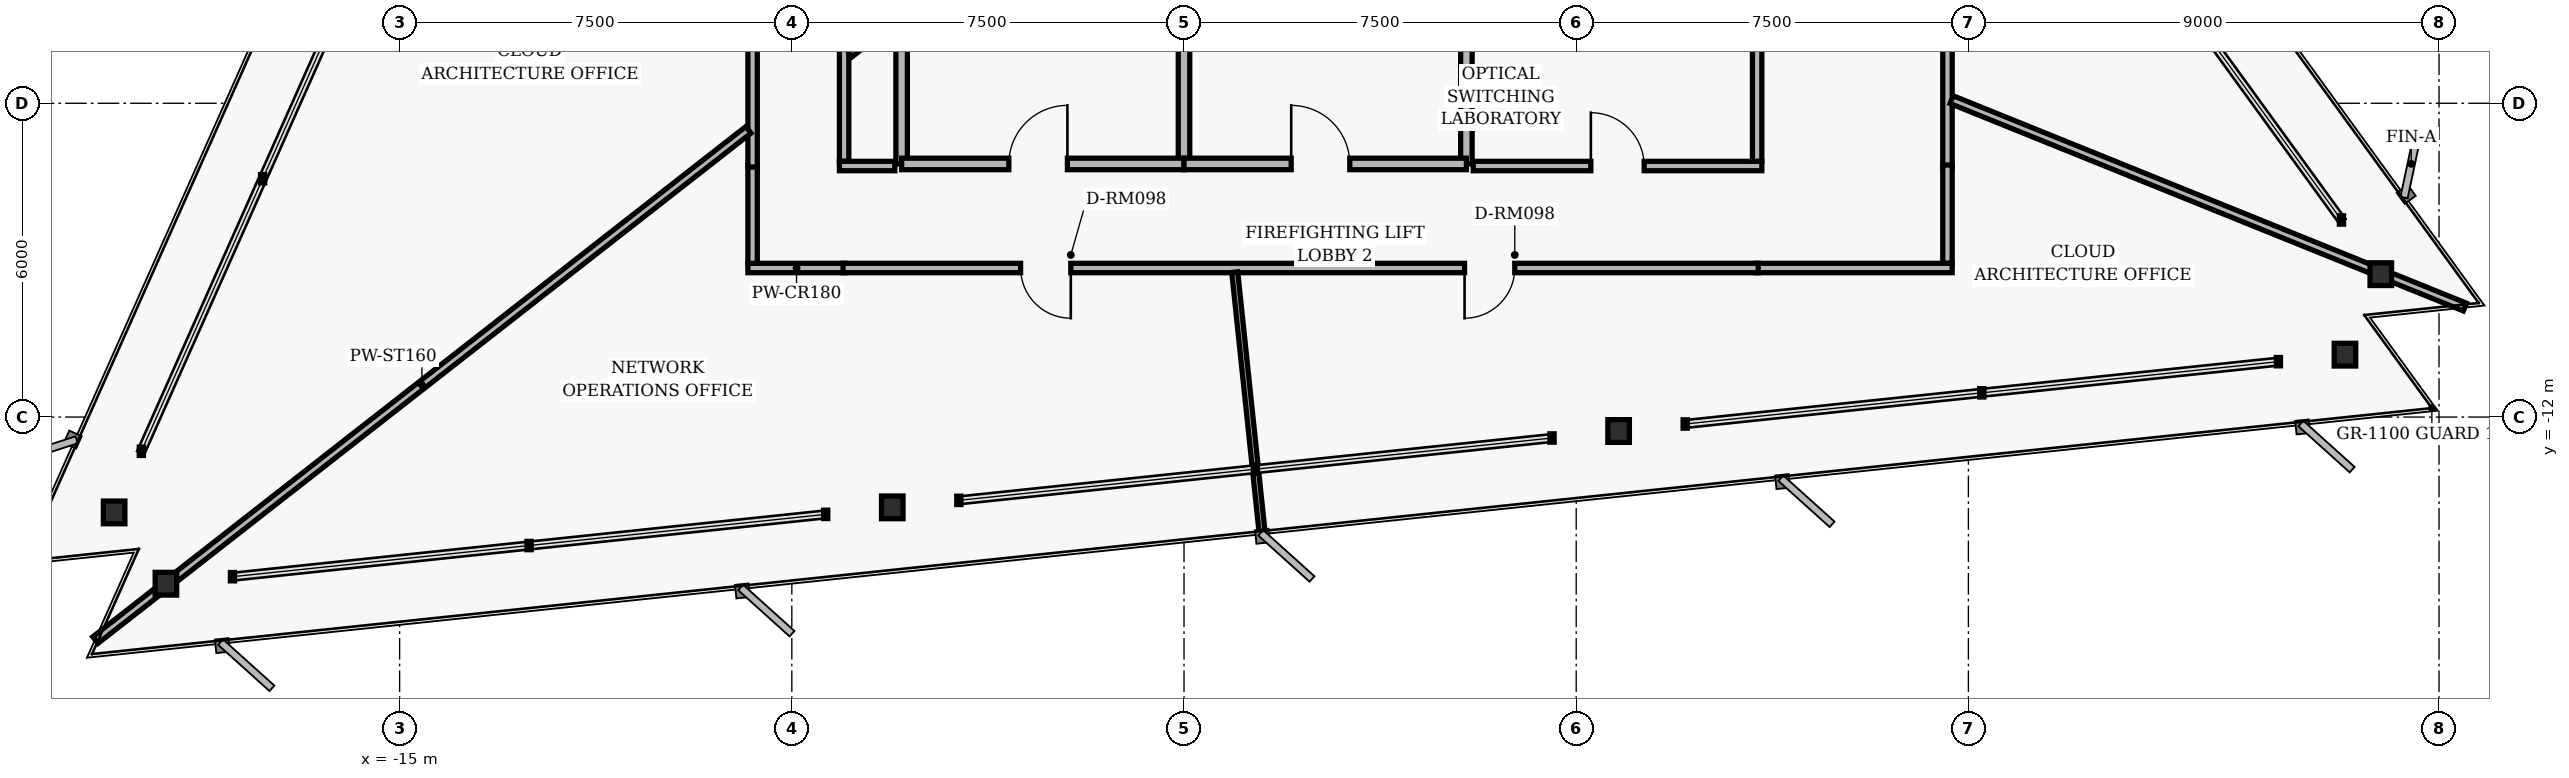
"""IFC4 building model, lengths in metres.
Left out: names, types, materials, properties, quantities, classifications, styles, units other than length and angle.
Written with IfcOpenShell. Run it as: python <this file> out.ifc"""

import sys

from ifc_helpers import new_model, si_unit, direction, frame, frame_2d, origin, origin_2d, place, context, subcontext, project, spatial, rectangle, i_section, extrude, element, fill, save


model = new_model("IFC4")
c1 = context("Model", 3, precision=1e-05, world=origin(), true_north=direction((0.0, 1.0)))
c2 = subcontext(c1, "Body", "Model", "MODEL_VIEW")
j1 = project(units=[si_unit("LENGTHUNIT", "METRE"), si_unit("PLANEANGLEUNIT", "RADIAN")], contexts=[c1])
p1 = place(None, origin())
s1 = spatial("IfcSite", under=j1, at=p1, CompositionType="ELEMENT")
p2 = place(p1, origin())
s2 = spatial("IfcBuilding", under=s1, at=p2, CompositionType="ELEMENT")
p3 = place(p2, frame((0.0, 0.0, 110.72)))
s3 = spatial("IfcBuildingStorey", under=s2, at=p3, CompositionType="ELEMENT", Elevation=110.72)
for number, where, z_axis, x_axis in (
    (1, (22.887, -9.268, 0.0), (0.0, 0.0, 1.0), (1.0, 0.0, 0.0)),
    (2, (-20.46, -13.823, 0.0), (0.0, 0.0, 1.0), (1.0, 0.0, 0.0)),
    (3, (-19.469, -15.187, 0.0), (0.0, 0.0, 1.0), (1.0, 0.0, 0.0)),
    (4, (-5.579, -13.727, 0.0), (0.0, 0.0, 1.0), (1.0, 0.0, 0.0)),
    (5, (8.311, -12.267, 0.0), (0.0, 0.0, 1.0), (1.0, 0.0, 0.0)),
    (6, (22.201, -10.807, 0.0), (0.0, 0.0, 1.0), (1.0, 0.0, 0.0)),
):
    element("IfcColumn", number, at=place(p3, frame(where, z_axis=z_axis, x_axis=x_axis)), inside=s3, PredefinedType="COLUMN", context=c2, shape_type="SweptSolid", body=[
        extrude(i_section(OverallWidth=0.412, OverallDepth=0.435, WebThickness=0.036, FlangeThickness=0.057, FilletRadius=0.022, at=origin_2d()), origin(), (0.0, 0.0, 1.0), 3.04),
    ])
for number, where, z_axis, x_axis in (
    (7, (-5.4, -7.16, 0.0), (0.0, 0.0, 1.0), (0.0, 1.0, 0.0)),
    (8, (5.4, -7.16, 0.0), (0.0, 0.0, 1.0), (0.0, 1.0, 0.0)),
):
    element("IfcWall", number, at=place(p3, frame(where, z_axis=z_axis, x_axis=x_axis)), inside=s3, PredefinedType="PARTITIONING", context=c2, shape_type="SweptSolid", body=[
        extrude(rectangle(XDim=2.71, YDim=0.22, at=frame_2d((1.355, 0.0))), origin(), (0.0, 0.0, 1.0), 2.763),
    ])
p4 = place(p3, frame((0.0, -7.16, 0.0), z_axis=(0.0, 0.0, 1.0), x_axis=(0.0, 1.0, 0.0)))
e9 = element("IfcWall", 9, at=p4, inside=s3, PredefinedType="PARTITIONING", context=c2, shape_type="SweptSolid", body=[
    extrude(rectangle(XDim=2.81, YDim=0.22, at=frame_2d((1.405, 0.0))), origin(), (0.0, 0.0, 1.0), 2.763),
])
p5 = place(p3, frame((-5.4, -7.16, 0.0), z_axis=(0.0, 0.0, 1.0), x_axis=(1.0, 0.0, 0.0)))
e10 = element("IfcWall", 10, at=p5, inside=s3, PredefinedType="PARTITIONING", context=c2, shape_type="SweptSolid", body=[
    extrude(rectangle(XDim=5.4, YDim=0.22, at=frame_2d((2.7, 0.0))), origin(), (0.0, 0.0, 1.0), 2.33),
])
p6 = place(p5, frame((2.05, 0.0, 0.0)))
e11 = element("IfcOpeningElement", 11, at=p6, cuts=e10, PredefinedType="OPENING", context=c2, shape_type="SweptSolid", body=[
    extrude(rectangle(XDim=1.12, YDim=2.02, at=frame_2d((0.56, 1.01))), frame((0.0, 0.12, 0.0), z_axis=(0.0, -1.0, 0.0), x_axis=(1.0, 0.0, 0.0)), (0.0, 0.0, 1.0), 0.24),
])
p7 = place(p3, frame((0.0, -7.16, 0.0), z_axis=(0.0, 0.0, 1.0), x_axis=(1.0, 0.0, 0.0)))
e12 = element("IfcWall", 12, at=p7, inside=s3, PredefinedType="PARTITIONING", context=c2, shape_type="SweptSolid", body=[
    extrude(rectangle(XDim=5.4, YDim=0.22, at=frame_2d((2.7, 0.0))), origin(), (0.0, 0.0, 1.0), 2.33),
])
p8 = place(p7, frame((2.05, 0.0, 0.0)))
e13 = element("IfcOpeningElement", 13, at=p8, cuts=e12, PredefinedType="OPENING", context=c2, shape_type="SweptSolid", body=[
    extrude(rectangle(XDim=1.12, YDim=2.02, at=frame_2d((0.56, 1.01))), frame((0.0, 0.12, 0.0), z_axis=(0.0, -1.0, 0.0), x_axis=(1.0, 0.0, 0.0)), (0.0, 0.0, 1.0), 0.24),
])
p9 = place(p3, frame((-6.48, -9.15, 0.0), z_axis=(0.0, 0.0, 1.0), x_axis=(-1.0, 0.0, 0.0)))
e14 = element("IfcWall", 14, at=p9, inside=s3, PredefinedType="PARTITIONING", context=c2, shape_type="SweptSolid", body=[
    extrude(rectangle(XDim=1.86, YDim=0.18, at=frame_2d((0.93, 0.0))), origin(), (0.0, 0.0, 1.0), 2.33),
])
p10 = place(p3, frame((-8.25, -9.06, 0.0), z_axis=(0.0, 0.0, 1.0), x_axis=(0.0, 1.0, 0.0)))
e15 = element("IfcWall", 15, at=p10, inside=s3, PredefinedType="PARTITIONING", context=c2, shape_type="SweptSolid", body=[
    extrude(rectangle(XDim=1.88, YDim=0.18, at=frame_2d((0.94, 0.0))), origin(), (0.0, 0.0, 1.0), 2.763),
])
p11 = place(p3, frame((-8.25, -7.22, 0.0), z_axis=(0.0, 0.0, 1.0), x_axis=(0.0, 1.0, 0.0)))
e16 = element("IfcWall", 16, at=p11, inside=s3, PredefinedType="PARTITIONING", context=c2, shape_type="SweptSolid", body=[
    extrude(rectangle(XDim=14.44, YDim=0.18, at=frame_2d((7.22, 0.0))), origin(), (0.0, 0.0, 1.0), 2.33),
])
p12 = place(p11, frame((3.038, 0.0, 0.0)))
e17 = element("IfcOpeningElement", 17, at=p12, cuts=e16, PredefinedType="OPENING", context=c2, shape_type="SweptSolid", body=[
    extrude(rectangle(XDim=0.96, YDim=2.02, at=frame_2d((0.48, 1.01))), frame((0.0, 0.1, 0.0), z_axis=(0.0, -1.0, 0.0), x_axis=(1.0, 0.0, 0.0)), (0.0, 0.0, 1.0), 0.2),
])
p13 = place(p11, frame((9.456, 0.0, 0.0)))
e18 = element("IfcOpeningElement", 18, at=p13, cuts=e16, PredefinedType="OPENING", context=c2, shape_type="SweptSolid", body=[
    extrude(rectangle(XDim=1.18, YDim=2.02, at=frame_2d((0.59, 1.01))), frame((0.0, 0.1, 0.0), z_axis=(0.0, -1.0, 0.0), x_axis=(1.0, 0.0, 0.0)), (0.0, 0.0, 1.0), 0.2),
])
p14 = place(p3, frame((14.6, 3.018, 0.0), z_axis=(0.0, 0.0, 1.0), x_axis=(0.0, -1.0, 0.0)))
e19 = element("IfcWall", 19, at=p14, inside=s3, PredefinedType="PARTITIONING", context=c2, shape_type="SweptSolid", body=[
    extrude(rectangle(XDim=10.238, YDim=0.18, at=frame_2d((5.119, 0.0))), origin(), (0.0, 0.0, 1.0), 2.763),
])
p15 = place(p14, frame((4.124, 0.0, 0.0)))
e20 = element("IfcOpeningElement", 20, at=p15, cuts=e19, PredefinedType="OPENING", context=c2, shape_type="SweptSolid", body=[
    extrude(rectangle(XDim=0.96, YDim=2.02, at=frame_2d((0.48, 1.01))), frame((0.0, 0.1, 0.0), z_axis=(0.0, -1.0, 0.0), x_axis=(1.0, 0.0, 0.0)), (0.0, 0.0, 1.0), 0.2),
])
p16 = place(p3, frame((14.6, -7.18, 0.0), z_axis=(0.0, 0.0, 1.0), x_axis=(0.0, -1.0, 0.0)))
e21 = element("IfcWall", 21, at=p16, inside=s3, PredefinedType="PARTITIONING", context=c2, shape_type="SweptSolid", body=[
    extrude(rectangle(XDim=1.88, YDim=0.18, at=frame_2d((0.94, 0.0))), origin(), (0.0, 0.0, 1.0), 2.763),
])
p17 = place(p3, frame((14.69, -9.15, 0.0), z_axis=(0.0, 0.0, 1.0), x_axis=(-1.0, 0.0, 0.0)))
e22 = element("IfcWall", 22, at=p17, inside=s3, PredefinedType="PARTITIONING", context=c2, shape_type="SweptSolid", body=[
    extrude(rectangle(XDim=3.75, YDim=0.18, at=frame_2d((1.875, 0.0))), origin(), (0.0, 0.0, 1.0), 2.33),
])
p18 = place(p3, frame((10.98, -9.15, 0.0), z_axis=(0.0, 0.0, 1.0), x_axis=(-1.0, 0.0, 0.0)))
e23 = element("IfcWall", 23, at=p18, inside=s3, PredefinedType="PARTITIONING", context=c2, shape_type="SweptSolid", body=[
    extrude(rectangle(XDim=17.5, YDim=0.18, at=frame_2d((8.75, 0.0))), origin(), (0.0, 0.0, 1.0), 2.33),
])
p19 = place(p18, frame((13.145, 0.0, 0.0)))
e24 = element("IfcOpeningElement", 24, at=p19, cuts=e23, PredefinedType="OPENING", context=c2, shape_type="SweptSolid", body=[
    extrude(rectangle(XDim=0.96, YDim=2.02, at=frame_2d((0.48, 1.01))), frame((0.0, 0.1, 0.0), z_axis=(0.0, -1.0, 0.0), x_axis=(1.0, 0.0, 0.0)), (0.0, 0.0, 1.0), 0.2),
])
p20 = place(p18, frame((4.655, 0.0, 0.0)))
e25 = element("IfcOpeningElement", 25, at=p20, cuts=e23, PredefinedType="OPENING", context=c2, shape_type="SweptSolid", body=[
    extrude(rectangle(XDim=0.96, YDim=2.02, at=frame_2d((0.48, 1.01))), frame((0.0, 0.1, 0.0), z_axis=(0.0, -1.0, 0.0), x_axis=(1.0, 0.0, 0.0)), (0.0, 0.0, 1.0), 0.2),
])
p21 = place(p3, frame((5.53, -7.2, 0.0), z_axis=(0.0, 0.0, 1.0), x_axis=(1.0, 0.0, 0.0)))
e26 = element("IfcWall", 26, at=p21, inside=s3, PredefinedType="PARTITIONING", context=c2, shape_type="SweptSolid", body=[
    extrude(rectangle(XDim=5.52, YDim=0.18, at=frame_2d((2.76, 0.0))), origin(), (0.0, 0.0, 1.0), 2.33),
])
p22 = place(p21, frame((2.25, 0.0, 0.0)))
e27 = element("IfcOpeningElement", 27, at=p22, cuts=e26, PredefinedType="OPENING", context=c2, shape_type="SweptSolid", body=[
    extrude(rectangle(XDim=1.02, YDim=2.02, at=frame_2d((0.51, 1.01))), frame((0.0, 0.1, 0.0), z_axis=(0.0, -1.0, 0.0), x_axis=(1.0, 0.0, 0.0)), (0.0, 0.0, 1.0), 0.2),
])
p23 = place(p3, frame((10.96, -7.11, 0.0), z_axis=(0.0, 0.0, 1.0), x_axis=(0.0, 1.0, 0.0)))
e28 = element("IfcWall", 28, at=p23, inside=s3, PredefinedType="PARTITIONING", context=c2, shape_type="SweptSolid", body=[
    extrude(rectangle(XDim=3.271, YDim=0.18, at=frame_2d((1.635, 0.0))), origin(), (0.0, 0.0, 1.0), 2.763),
])
p24 = place(p3, frame((-6.5, -4.88, 0.0), z_axis=(0.0, 0.0, 1.0), x_axis=(0.0, -1.0, 0.0)))
e29 = element("IfcWall", 29, at=p24, inside=s3, PredefinedType="PARTITIONING", context=c2, shape_type="SweptSolid", body=[
    extrude(rectangle(XDim=2.23, YDim=0.18, at=frame_2d((1.115, 0.0))), origin(), (0.0, 0.0, 1.0), 2.763),
])
p25 = place(p3, frame((-6.59, -7.2, 0.0), z_axis=(0.0, 0.0, 1.0), x_axis=(1.0, 0.0, 0.0)))
e30 = element("IfcWall", 30, at=p25, inside=s3, PredefinedType="PARTITIONING", context=c2, shape_type="SweptSolid", body=[
    extrude(rectangle(XDim=1.06, YDim=0.18, at=frame_2d((0.53, 0.0))), origin(), (0.0, 0.0, 1.0), 2.33),
])
p26 = place(p3, frame((-5.836, -4.56, 0.0), z_axis=(0.0, 0.0, 1.0), x_axis=(-0.788054366409, -0.615605649408, 0.0)))
e31 = element("IfcWall", 31, at=p26, inside=s3, PredefinedType="PARTITIONING", context=c2, shape_type="SweptSolid", body=[
    extrude(rectangle(XDim=0.74, YDim=0.24, at=frame_2d((0.37, 0.0))), origin(), (0.0, 0.0, 1.0), 2.132),
])
p27 = place(p3, frame((-8.33, -6.508, 0.0), z_axis=(0.0, 0.0, 1.0), x_axis=(-0.788011528275, -0.615660483794, 0.0)))
e32 = element("IfcWall", 32, at=p27, inside=s3, PredefinedType="PARTITIONING", context=c2, shape_type="SweptSolid", body=[
    extrude(rectangle(XDim=15.848, YDim=0.16, at=frame_2d((7.924, 0.0))), origin(), (0.0, 0.0, 1.0), 2.132),
])
p28 = place(p3, frame((0.97, -9.23, 0.0), z_axis=(0.0, 0.0, 1.0), x_axis=(0.104502779655, -0.994524594489, 0.0)))
e33 = element("IfcWall", 33, at=p28, inside=s3, PredefinedType="MOVABLE", context=c2, shape_type="SweptSolid", body=[
    extrude(rectangle(XDim=5.028, YDim=0.115, at=frame_2d((2.514, 0.0))), origin(), (0.0, 0.0, 1.0), 2.763),
])
p29 = place(p3, frame((14.68, -5.931, 0.0), z_axis=(0.0, 0.0, 1.0), x_axis=(0.927187622353, -0.374597267682, 0.0)))
e34 = element("IfcWall", 34, at=p29, inside=s3, PredefinedType="PARTITIONING", context=c2, shape_type="SweptSolid", body=[
    extrude(rectangle(XDim=10.586, YDim=0.16, at=frame_2d((5.293, 0.0))), origin(), (0.0, 0.0, 1.0), 2.132),
])
p30 = place(p6, origin())
e35 = element("IfcDoor", 35, at=p30, inside=s3, OperationType="SINGLE_SWING_RIGHT", PredefinedType="DOOR", context=c2, shape_type="SweptSolid", body=[
    extrude(rectangle(XDim=1.12, YDim=2.02, at=frame_2d((0.56, 1.01))), frame((0.0, 0.025, 0.0), z_axis=(0.0, -1.0, 0.0), x_axis=(1.0, 0.0, 0.0)), (0.0, 0.0, 1.0), 0.05),
])
fill(e11, e35)
p31 = place(p8, origin())
e36 = element("IfcDoor", 36, at=p31, inside=s3, OperationType="SINGLE_SWING_LEFT", PredefinedType="DOOR", context=c2, shape_type="SweptSolid", body=[
    extrude(rectangle(XDim=1.12, YDim=2.02, at=frame_2d((0.56, 1.01))), frame((0.0, 0.025, 0.0), z_axis=(0.0, -1.0, 0.0), x_axis=(1.0, 0.0, 0.0)), (0.0, 0.0, 1.0), 0.05),
])
fill(e13, e36)
p32 = place(p19, origin())
e37 = element("IfcDoor", 37, at=p32, inside=s3, OperationType="SINGLE_SWING_LEFT", PredefinedType="DOOR", context=c2, shape_type="SweptSolid", body=[
    extrude(rectangle(XDim=0.96, YDim=2.02, at=frame_2d((0.48, 1.01))), frame((0.0, 0.025, 0.0), z_axis=(0.0, -1.0, 0.0), x_axis=(1.0, 0.0, 0.0)), (0.0, 0.0, 1.0), 0.05),
])
fill(e24, e37)
p33 = place(p20, origin())
e38 = element("IfcDoor", 38, at=p33, inside=s3, OperationType="SINGLE_SWING_RIGHT", PredefinedType="DOOR", context=c2, shape_type="SweptSolid", body=[
    extrude(rectangle(XDim=0.96, YDim=2.02, at=frame_2d((0.48, 1.01))), frame((0.0, 0.025, 0.0), z_axis=(0.0, -1.0, 0.0), x_axis=(1.0, 0.0, 0.0)), (0.0, 0.0, 1.0), 0.05),
])
fill(e25, e38)
p34 = place(p22, origin())
e39 = element("IfcDoor", 39, at=p34, inside=s3, OperationType="SINGLE_SWING_LEFT", PredefinedType="DOOR", context=c2, shape_type="SweptSolid", body=[
    extrude(rectangle(XDim=1.02, YDim=2.02, at=frame_2d((0.51, 1.01))), frame((0.0, 0.025, 0.0), z_axis=(0.0, -1.0, 0.0), x_axis=(1.0, 0.0, 0.0)), (0.0, 0.0, 1.0), 0.05),
])
fill(e27, e39)
save(model, sys.argv[1])
